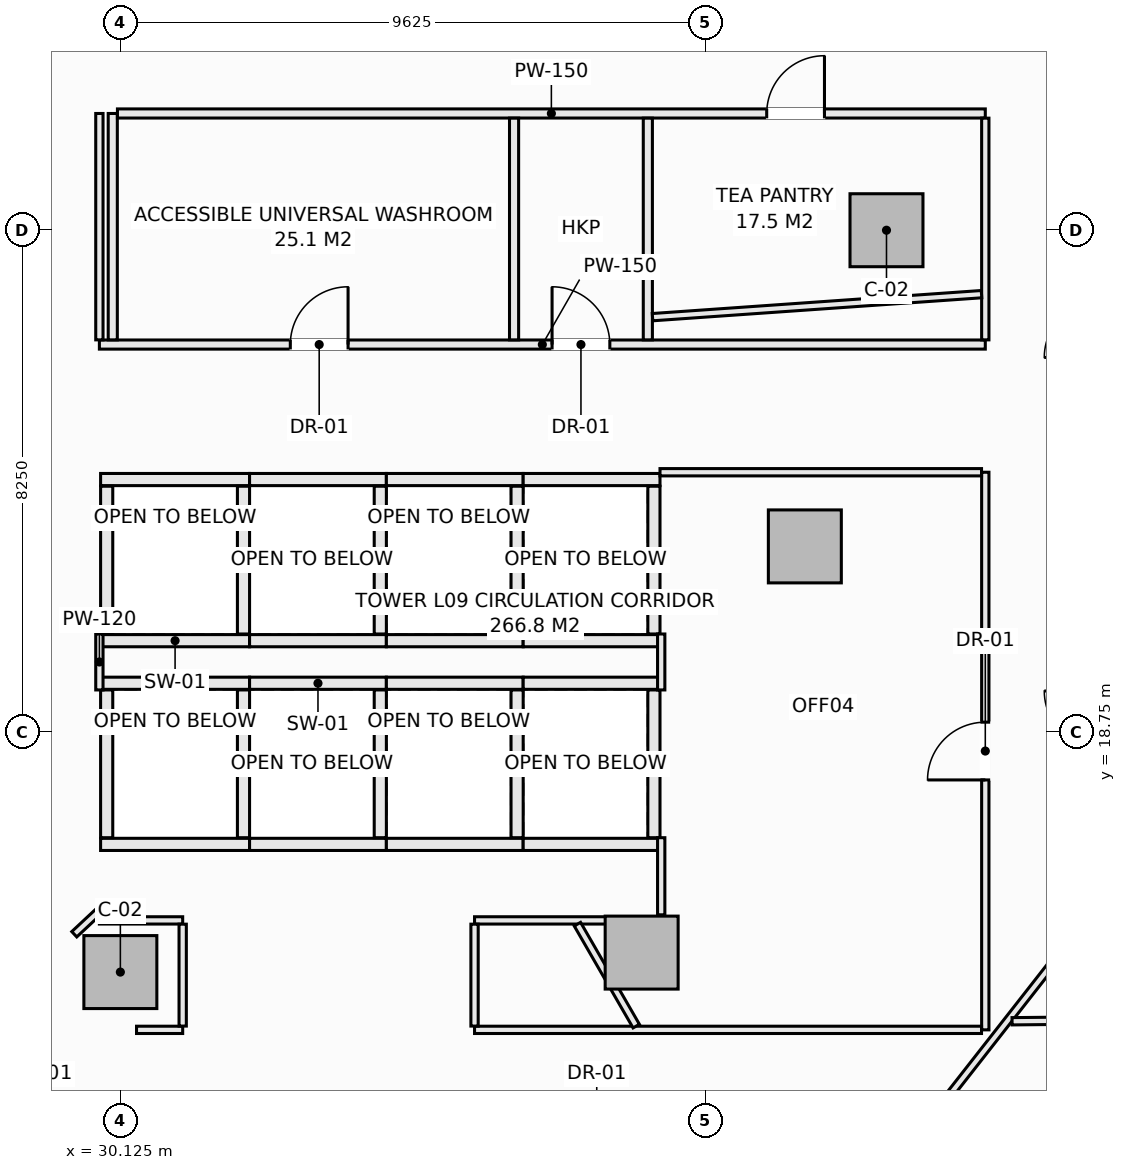
"""IFC4 building model, lengths in metres.
Left out: names, types, materials, properties, quantities, classifications, styles, units other than length and angle.
Written with IfcOpenShell. Run it as: python <this file> out.ifc"""

import sys

from ifc_helpers import new_model, si_unit, direction, frame, frame_2d, origin, origin_2d, place, context, subcontext, project, spatial, rectangle, extrude, element, fill, save


model = new_model("IFC4")
c1 = context("Model", 3, precision=1e-05, world=origin(), true_north=direction((0.0, 1.0)))
c2 = subcontext(c1, "Body", "Model", "MODEL_VIEW")
j1 = project(units=[si_unit("LENGTHUNIT", "METRE"), si_unit("PLANEANGLEUNIT", "RADIAN")], contexts=[c1])
p1 = place(None, origin())
s1 = spatial("IfcSite", under=j1, at=p1, CompositionType="ELEMENT")
p2 = place(p1, origin())
s2 = spatial("IfcBuilding", under=s1, at=p2, CompositionType="ELEMENT")
p3 = place(p2, frame((0.0, 0.0, 41.9)))
s3 = spatial("IfcBuildingStorey", under=s2, at=p3, CompositionType="ELEMENT", Elevation=41.9)
for number, where, z_axis, x_axis in (
    (1, (42.725, 27.0, -0.28), (0.0, 0.0, 1.0), (1.0, 0.0, 0.0)),
    (2, (30.125, 14.8, -0.28), (0.0, 0.0, 1.0), (1.0, 0.0, 0.0)),
    (3, (38.698, 15.121, -0.28), (0.0, 0.0, 1.0), (1.0, 0.0, 0.0)),
    (4, (41.382, 21.801, -0.28), (0.0, 0.0, 1.0), (1.0, 0.0, 0.0)),
):
    element("IfcColumn", number, at=place(p3, frame(where, z_axis=z_axis, x_axis=x_axis)), inside=s3, PredefinedType="COLUMN", context=c2, shape_type="SweptSolid", body=[
        extrude(rectangle(XDim=1.2, YDim=1.2, at=origin_2d()), origin(), (0.0, 0.0, 1.0), 3.85),
    ])
p4 = place(p3, frame((44.188, 7.514, 0.0), z_axis=(0.0, 0.0, 1.0), x_axis=(0.616421309777, 0.787416515482, 0.0)))
e5 = element("IfcWall", 5, at=p4, inside=s3, PredefinedType="SOLIDWALL", context=c2, shape_type="SweptSolid", body=[
    extrude(rectangle(XDim=6.696, YDim=0.3, at=frame_2d((3.348, 0.0))), origin(), (0.0, 0.0, 1.0), 3.093),
])
p5 = place(p4, frame((2.148, 0.0, 0.85)))
e6 = element("IfcOpeningElement", 6, at=p5, cuts=e5, PredefinedType="OPENING", context=c2, shape_type="SweptSolid", body=[
    extrude(rectangle(XDim=2.4, YDim=1.9, at=frame_2d((1.2, 0.95))), frame((0.0, 0.16, 0.0), z_axis=(0.0, -1.0, 0.0), x_axis=(1.0, 0.0, 0.0)), (0.0, 0.0, 1.0), 0.32),
])
for number, where, z_axis, x_axis in (
    (7, (29.8, 19.55, 0.0), (0.0, 0.0, 1.0), (1.0, 0.0, 0.0)),
    (8, (29.8, 16.9, 0.0), (0.0, 0.0, 1.0), (1.0, 0.0, 0.0)),
):
    element("IfcWall", number, at=place(p3, frame(where, z_axis=z_axis, x_axis=x_axis)), inside=s3, PredefinedType="SOLIDWALL", context=c2, shape_type="SweptSolid", body=[
        extrude(rectangle(XDim=2.45, YDim=0.2, at=frame_2d((1.225, 0.0))), origin(), (0.0, 0.0, 1.0), 3.57),
    ])
for number, where, z_axis, x_axis in (
    (9, (29.9, 17.01, 0.0), (0.0, 0.0, 1.0), (0.0, 1.0, 0.0)),
    (10, (32.15, 17.01, 0.0), (0.0, 0.0, 1.0), (0.0, 1.0, 0.0)),
):
    element("IfcWall", number, at=place(p3, frame(where, z_axis=z_axis, x_axis=x_axis)), inside=s3, PredefinedType="SOLIDWALL", context=c2, shape_type="SweptSolid", body=[
        extrude(rectangle(XDim=2.43, YDim=0.2, at=frame_2d((1.215, 0.0))), origin(), (0.0, 0.0, 1.0), 3.57),
    ])
for number, where, z_axis, x_axis in (
    (11, (32.25, 19.55, 0.0), (0.0, 0.0, 1.0), (1.0, 0.0, 0.0)),
    (12, (32.25, 16.9, 0.0), (0.0, 0.0, 1.0), (1.0, 0.0, 0.0)),
):
    element("IfcWall", number, at=place(p3, frame(where, z_axis=z_axis, x_axis=x_axis)), inside=s3, PredefinedType="SOLIDWALL", context=c2, shape_type="SweptSolid", body=[
        extrude(rectangle(XDim=2.25, YDim=0.2, at=frame_2d((1.125, 0.0))), origin(), (0.0, 0.0, 1.0), 3.57),
    ])
p6 = place(p3, frame((34.4, 17.01, 0.0), z_axis=(0.0, 0.0, 1.0), x_axis=(0.0, 1.0, 0.0)))
e13 = element("IfcWall", 13, at=p6, inside=s3, PredefinedType="SOLIDWALL", context=c2, shape_type="SweptSolid", body=[
    extrude(rectangle(XDim=2.43, YDim=0.2, at=frame_2d((1.215, 0.0))), origin(), (0.0, 0.0, 1.0), 3.57),
])
for number, where, z_axis, x_axis in (
    (14, (34.5, 19.55, 0.0), (0.0, 0.0, 1.0), (1.0, 0.0, 0.0)),
    (15, (34.5, 16.9, 0.0), (0.0, 0.0, 1.0), (1.0, 0.0, 0.0)),
):
    element("IfcWall", number, at=place(p3, frame(where, z_axis=z_axis, x_axis=x_axis)), inside=s3, PredefinedType="SOLIDWALL", context=c2, shape_type="SweptSolid", body=[
        extrude(rectangle(XDim=2.25, YDim=0.2, at=frame_2d((1.125, 0.0))), origin(), (0.0, 0.0, 1.0), 3.57),
    ])
p7 = place(p3, frame((36.65, 17.01, 0.0), z_axis=(0.0, 0.0, 1.0), x_axis=(0.0, 1.0, 0.0)))
e16 = element("IfcWall", 16, at=p7, inside=s3, PredefinedType="SOLIDWALL", context=c2, shape_type="SweptSolid", body=[
    extrude(rectangle(XDim=2.43, YDim=0.2, at=frame_2d((1.215, 0.0))), origin(), (0.0, 0.0, 1.0), 3.57),
])
for number, where, z_axis, x_axis in (
    (17, (36.75, 19.55, 0.0), (0.0, 0.0, 1.0), (1.0, 0.0, 0.0)),
    (18, (36.75, 16.9, 0.0), (0.0, 0.0, 1.0), (1.0, 0.0, 0.0)),
):
    element("IfcWall", number, at=place(p3, frame(where, z_axis=z_axis, x_axis=x_axis)), inside=s3, PredefinedType="SOLIDWALL", context=c2, shape_type="SweptSolid", body=[
        extrude(rectangle(XDim=2.25, YDim=0.2, at=frame_2d((1.125, 0.0))), origin(), (0.0, 0.0, 1.0), 3.57),
    ])
p8 = place(p3, frame((38.9, 17.01, 0.0), z_axis=(0.0, 0.0, 1.0), x_axis=(0.0, 1.0, 0.0)))
e19 = element("IfcWall", 19, at=p8, inside=s3, PredefinedType="SOLIDWALL", context=c2, shape_type="SweptSolid", body=[
    extrude(rectangle(XDim=2.43, YDim=0.2, at=frame_2d((1.215, 0.0))), origin(), (0.0, 0.0, 1.0), 3.57),
])
for number, where, z_axis, x_axis in (
    (20, (29.8, 22.9, 0.0), (0.0, 0.0, 1.0), (1.0, 0.0, 0.0)),
    (21, (29.8, 20.25, 0.0), (0.0, 0.0, 1.0), (1.0, 0.0, 0.0)),
):
    element("IfcWall", number, at=place(p3, frame(where, z_axis=z_axis, x_axis=x_axis)), inside=s3, PredefinedType="SOLIDWALL", context=c2, shape_type="SweptSolid", body=[
        extrude(rectangle(XDim=2.45, YDim=0.2, at=frame_2d((1.225, 0.0))), origin(), (0.0, 0.0, 1.0), 3.57),
    ])
for number, where, z_axis, x_axis in (
    (22, (29.9, 20.36, 0.0), (0.0, 0.0, 1.0), (0.0, 1.0, 0.0)),
    (23, (32.15, 20.36, 0.0), (0.0, 0.0, 1.0), (0.0, 1.0, 0.0)),
):
    element("IfcWall", number, at=place(p3, frame(where, z_axis=z_axis, x_axis=x_axis)), inside=s3, PredefinedType="SOLIDWALL", context=c2, shape_type="SweptSolid", body=[
        extrude(rectangle(XDim=2.43, YDim=0.2, at=frame_2d((1.215, 0.0))), origin(), (0.0, 0.0, 1.0), 3.57),
    ])
for number, where, z_axis, x_axis in (
    (24, (32.25, 22.9, 0.0), (0.0, 0.0, 1.0), (1.0, 0.0, 0.0)),
    (25, (32.25, 20.25, 0.0), (0.0, 0.0, 1.0), (1.0, 0.0, 0.0)),
):
    element("IfcWall", number, at=place(p3, frame(where, z_axis=z_axis, x_axis=x_axis)), inside=s3, PredefinedType="SOLIDWALL", context=c2, shape_type="SweptSolid", body=[
        extrude(rectangle(XDim=2.25, YDim=0.2, at=frame_2d((1.125, 0.0))), origin(), (0.0, 0.0, 1.0), 3.57),
    ])
p9 = place(p3, frame((34.4, 20.36, 0.0), z_axis=(0.0, 0.0, 1.0), x_axis=(0.0, 1.0, 0.0)))
e26 = element("IfcWall", 26, at=p9, inside=s3, PredefinedType="SOLIDWALL", context=c2, shape_type="SweptSolid", body=[
    extrude(rectangle(XDim=2.43, YDim=0.2, at=frame_2d((1.215, 0.0))), origin(), (0.0, 0.0, 1.0), 3.57),
])
for number, where, z_axis, x_axis in (
    (27, (34.5, 22.9, 0.0), (0.0, 0.0, 1.0), (1.0, 0.0, 0.0)),
    (28, (34.5, 20.25, 0.0), (0.0, 0.0, 1.0), (1.0, 0.0, 0.0)),
):
    element("IfcWall", number, at=place(p3, frame(where, z_axis=z_axis, x_axis=x_axis)), inside=s3, PredefinedType="SOLIDWALL", context=c2, shape_type="SweptSolid", body=[
        extrude(rectangle(XDim=2.25, YDim=0.2, at=frame_2d((1.125, 0.0))), origin(), (0.0, 0.0, 1.0), 3.57),
    ])
p10 = place(p3, frame((36.65, 20.36, 0.0), z_axis=(0.0, 0.0, 1.0), x_axis=(0.0, 1.0, 0.0)))
e29 = element("IfcWall", 29, at=p10, inside=s3, PredefinedType="SOLIDWALL", context=c2, shape_type="SweptSolid", body=[
    extrude(rectangle(XDim=2.43, YDim=0.2, at=frame_2d((1.215, 0.0))), origin(), (0.0, 0.0, 1.0), 3.57),
])
for number, where, z_axis, x_axis in (
    (30, (36.75, 22.9, 0.0), (0.0, 0.0, 1.0), (1.0, 0.0, 0.0)),
    (31, (36.75, 20.25, 0.0), (0.0, 0.0, 1.0), (1.0, 0.0, 0.0)),
):
    element("IfcWall", number, at=place(p3, frame(where, z_axis=z_axis, x_axis=x_axis)), inside=s3, PredefinedType="SOLIDWALL", context=c2, shape_type="SweptSolid", body=[
        extrude(rectangle(XDim=2.25, YDim=0.2, at=frame_2d((1.125, 0.0))), origin(), (0.0, 0.0, 1.0), 3.57),
    ])
p11 = place(p3, frame((38.9, 20.36, 0.0), z_axis=(0.0, 0.0, 1.0), x_axis=(0.0, 1.0, 0.0)))
e32 = element("IfcWall", 32, at=p11, inside=s3, PredefinedType="SOLIDWALL", context=c2, shape_type="SweptSolid", body=[
    extrude(rectangle(XDim=2.43, YDim=0.2, at=frame_2d((1.215, 0.0))), origin(), (0.0, 0.0, 1.0), 3.57),
])
p12 = place(p3, frame((29.78, 25.12, 0.0), z_axis=(0.0, 0.0, 1.0), x_axis=(1.0, 0.0, 0.0)))
e33 = element("IfcWall", 33, at=p12, inside=s3, PredefinedType="PARTITIONING", context=c2, shape_type="SweptSolid", body=[
    extrude(rectangle(XDim=14.57, YDim=0.15, at=frame_2d((7.285, 0.0))), origin(), (0.0, 0.0, 1.0), 3.57),
])
p13 = place(p12, frame((3.14, 0.0, 0.0)))
e34 = element("IfcOpeningElement", 34, at=p13, cuts=e33, PredefinedType="OPENING", context=c2, shape_type="SweptSolid", body=[
    extrude(rectangle(XDim=0.95, YDim=2.1, at=frame_2d((0.475, 1.05))), frame((0.0, 0.085, 0.0), z_axis=(0.0, -1.0, 0.0), x_axis=(1.0, 0.0, 0.0)), (0.0, 0.0, 1.0), 0.17),
])
p14 = place(p12, frame((7.445, 0.0, 0.0)))
e35 = element("IfcOpeningElement", 35, at=p14, cuts=e33, PredefinedType="OPENING", context=c2, shape_type="SweptSolid", body=[
    extrude(rectangle(XDim=0.95, YDim=2.1, at=frame_2d((0.475, 1.05))), frame((0.0, 0.085, 0.0), z_axis=(0.0, -1.0, 0.0), x_axis=(1.0, 0.0, 0.0)), (0.0, 0.0, 1.0), 0.17),
])
p15 = place(p3, frame((30.0, 25.197, 0.0), z_axis=(0.0, 0.0, 1.0), x_axis=(0.0, 1.0, 0.0)))
e36 = element("IfcWall", 36, at=p15, inside=s3, PredefinedType="PARTITIONING", context=c2, shape_type="SweptSolid", body=[
    extrude(rectangle(XDim=3.723, YDim=0.15, at=frame_2d((1.861, 0.0))), origin(), (0.0, 0.0, 1.0), 3.57),
])
p16 = place(p3, frame((30.077, 28.92, 0.0), z_axis=(0.0, 0.0, 1.0), x_axis=(1.0, 0.0, 0.0)))
e37 = element("IfcWall", 37, at=p16, inside=s3, PredefinedType="PARTITIONING", context=c2, shape_type="SweptSolid", body=[
    extrude(rectangle(XDim=14.273, YDim=0.15, at=frame_2d((7.137, 0.0))), origin(), (0.0, 0.0, 1.0), 3.57),
])
p17 = place(p16, frame((10.678, 0.0, 0.0)))
e38 = element("IfcOpeningElement", 38, at=p17, cuts=e37, PredefinedType="OPENING", context=c2, shape_type="SweptSolid", body=[
    extrude(rectangle(XDim=0.95, YDim=2.1, at=frame_2d((0.475, 1.05))), frame((0.0, 0.085, 0.0), z_axis=(0.0, -1.0, 0.0), x_axis=(1.0, 0.0, 0.0)), (0.0, 0.0, 1.0), 0.17),
])
for number, where, z_axis, x_axis in (
    (39, (36.6, 25.197, 0.0), (0.0, 0.0, 1.0), (0.0, 1.0, 0.0)),
    (40, (38.8, 25.197, 0.0), (0.0, 0.0, 1.0), (0.0, 1.0, 0.0)),
):
    element("IfcWall", number, at=place(p3, frame(where, z_axis=z_axis, x_axis=x_axis)), inside=s3, PredefinedType="PARTITIONING", context=c2, shape_type="SweptSolid", body=[
        extrude(rectangle(XDim=3.646, YDim=0.15, at=frame_2d((1.823, 0.0))), origin(), (0.0, 0.0, 1.0), 3.57),
    ])
p18 = place(p3, frame((29.78, 19.44, 0.0), z_axis=(0.0, 0.0, 1.0), x_axis=(0.0, 1.0, 0.0)))
e41 = element("IfcWall", 41, at=p18, inside=s3, PredefinedType="PARTITIONING", context=c2, shape_type="SweptSolid", body=[
    extrude(rectangle(XDim=0.92, YDim=0.12, at=frame_2d((0.46, 0.0))), origin(), (0.0, 0.0, 1.0), 3.57),
])
p19 = place(p3, frame((29.78, 25.197, 0.0), z_axis=(0.0, 0.0, 1.0), x_axis=(0.0, 1.0, 0.0)))
e42 = element("IfcWall", 42, at=p19, inside=s3, PredefinedType="PARTITIONING", context=c2, shape_type="SweptSolid", body=[
    extrude(rectangle(XDim=3.723, YDim=0.12, at=frame_2d((1.861, 0.0))), origin(), (0.0, 0.0, 1.0), 3.57),
])
p20 = place(p3, frame((44.35, 13.85, 0.0), z_axis=(0.0, 0.0, 1.0), x_axis=(0.0, 1.0, 0.0)))
e43 = element("IfcWall", 43, at=p20, inside=s3, PredefinedType="PARTITIONING", context=c2, shape_type="SweptSolid", body=[
    extrude(rectangle(XDim=9.17, YDim=0.12, at=frame_2d((4.585, 0.0))), origin(), (0.0, 0.0, 1.0), 3.57),
])
p21 = place(p20, frame((4.11, 0.0, 0.0)))
e44 = element("IfcOpeningElement", 44, at=p21, cuts=e43, PredefinedType="OPENING", context=c2, shape_type="SweptSolid", body=[
    extrude(rectangle(XDim=0.95, YDim=2.1, at=frame_2d((0.475, 1.05))), frame((0.0, 0.07, 0.0), z_axis=(0.0, -1.0, 0.0), x_axis=(1.0, 0.0, 0.0)), (0.0, 0.0, 1.0), 0.14),
])
p22 = place(p3, frame((44.35, 25.197, 0.0), z_axis=(0.0, 0.0, 1.0), x_axis=(0.0, 1.0, 0.0)))
e45 = element("IfcWall", 45, at=p22, inside=s3, PredefinedType="PARTITIONING", context=c2, shape_type="SweptSolid", body=[
    extrude(rectangle(XDim=3.646, YDim=0.12, at=frame_2d((1.823, 0.0))), origin(), (0.0, 0.0, 1.0), 3.57),
])
p23 = place(p3, frame((42.957, 11.75, 0.0), z_axis=(0.0, 0.0, 1.0), x_axis=(0.616428289415, 0.78741105149, 0.0)))
e46 = element("IfcWall", 46, at=p23, inside=s3, PredefinedType="PARTITIONING", context=c2, shape_type="SweptSolid", body=[
    extrude(rectangle(XDim=5.375, YDim=0.12, at=frame_2d((2.687, 0.0))), origin(), (0.0, 0.0, 1.0), 3.57),
])
p24 = place(p3, frame((30.391, 13.85, 0.0), z_axis=(0.0, 0.0, 1.0), x_axis=(1.0, 0.0, 0.0)))
e47 = element("IfcWall", 47, at=p24, inside=s3, PredefinedType="PARTITIONING", context=c2, shape_type="SweptSolid", body=[
    extrude(rectangle(XDim=0.759, YDim=0.12, at=frame_2d((0.379, 0.0))), origin(), (0.0, 0.0, 1.0), 3.57),
])
p25 = place(p3, frame((35.95, 13.85, 0.0), z_axis=(0.0, 0.0, 1.0), x_axis=(1.0, 0.0, 0.0)))
e48 = element("IfcWall", 48, at=p25, inside=s3, PredefinedType="PARTITIONING", context=c2, shape_type="SweptSolid", body=[
    extrude(rectangle(XDim=8.338, YDim=0.12, at=frame_2d((4.169, 0.0))), origin(), (0.0, 0.0, 1.0), 3.57),
])
p26 = place(p3, frame((29.78, 15.65, 0.0), z_axis=(0.0, 0.0, 1.0), x_axis=(1.0, 0.0, 0.0)))
e49 = element("IfcWall", 49, at=p26, inside=s3, PredefinedType="PARTITIONING", context=c2, shape_type="SweptSolid", body=[
    extrude(rectangle(XDim=1.37, YDim=0.12, at=frame_2d((0.685, 0.0))), origin(), (0.0, 0.0, 1.0), 3.57),
])
p27 = place(p3, frame((35.95, 15.65, 0.0), z_axis=(0.0, 0.0, 1.0), x_axis=(1.0, 0.0, 0.0)))
e50 = element("IfcWall", 50, at=p27, inside=s3, PredefinedType="PARTITIONING", context=c2, shape_type="SweptSolid", body=[
    extrude(rectangle(XDim=2.291, YDim=0.12, at=frame_2d((1.146, 0.0))), origin(), (0.0, 0.0, 1.0), 3.57),
])
p28 = place(p3, frame((35.95, 13.912, 0.0), z_axis=(0.0, 0.0, 1.0), x_axis=(0.0, 1.0, 0.0)))
e51 = element("IfcWall", 51, at=p28, inside=s3, PredefinedType="PARTITIONING", context=c2, shape_type="SweptSolid", body=[
    extrude(rectangle(XDim=1.676, YDim=0.12, at=frame_2d((0.838, 0.0))), origin(), (0.0, 0.0, 1.0), 3.57),
])
p29 = place(p3, frame((39.0, 23.02, 0.0), z_axis=(0.0, 0.0, 1.0), x_axis=(1.0, 0.0, 0.0)))
e52 = element("IfcWall", 52, at=p29, inside=s3, PredefinedType="PARTITIONING", context=c2, shape_type="SweptSolid", body=[
    extrude(rectangle(XDim=5.288, YDim=0.12, at=frame_2d((2.644, 0.0))), origin(), (0.0, 0.0, 1.0), 3.57),
])
p30 = place(p3, frame((39.02, 15.742, 0.0), z_axis=(0.0, 0.0, 1.0), x_axis=(0.0, 1.0, 0.0)))
e53 = element("IfcWall", 53, at=p30, inside=s3, PredefinedType="PARTITIONING", context=c2, shape_type="SweptSolid", body=[
    extrude(rectangle(XDim=1.268, YDim=0.12, at=frame_2d((0.634, 0.0))), origin(), (0.0, 0.0, 1.0), 2.934),
])
p31 = place(p3, frame((39.02, 19.44, 0.0), z_axis=(0.0, 0.0, 1.0), x_axis=(0.0, 1.0, 0.0)))
e54 = element("IfcWall", 54, at=p31, inside=s3, PredefinedType="PARTITIONING", context=c2, shape_type="SweptSolid", body=[
    extrude(rectangle(XDim=0.92, YDim=0.12, at=frame_2d((0.46, 0.0))), origin(), (0.0, 0.0, 1.0), 3.57),
])
p32 = place(p3, frame((29.367, 15.422, 0.0), z_axis=(0.0, 0.0, 1.0), x_axis=(0.730667420492, 0.682733564893, 0.0)))
e55 = element("IfcWall", 55, at=p32, inside=s3, PredefinedType="PARTITIONING", context=c2, shape_type="SweptSolid", body=[
    extrude(rectangle(XDim=0.565, YDim=0.12, at=frame_2d((0.283, 0.0))), origin(), (0.0, 0.0, 1.0), 3.57),
])
p33 = place(p3, frame((31.15, 13.912, 0.0), z_axis=(0.0, 0.0, 1.0), x_axis=(0.0, 1.0, 0.0)))
e56 = element("IfcWall", 56, at=p33, inside=s3, PredefinedType="PARTITIONING", context=c2, shape_type="SweptSolid", body=[
    extrude(rectangle(XDim=1.676, YDim=0.12, at=frame_2d((0.838, 0.0))), origin(), (0.0, 0.0, 1.0), 3.57),
])
p34 = place(p3, frame((44.79, 13.991, 0.0), z_axis=(0.0, 0.0, 1.0), x_axis=(0.999951876208, 0.009810467268, 0.0)))
e57 = element("IfcWall", 57, at=p34, inside=s3, PredefinedType="PARTITIONING", context=c2, shape_type="SweptSolid", body=[
    extrude(rectangle(XDim=5.798, YDim=0.12, at=frame_2d((2.899, 0.0))), origin(), (0.0, 0.0, 1.0), 3.205),
])
p35 = place(p3, frame((37.642, 15.588, 0.0), z_axis=(0.0, 0.0, 1.0), x_axis=(0.499911776505, -0.866076333652, 0.0)))
e58 = element("IfcWall", 58, at=p35, inside=s3, PredefinedType="PARTITIONING", context=c2, shape_type="SweptSolid", body=[
    extrude(rectangle(XDim=1.935, YDim=0.12, at=frame_2d((0.967, 0.0))), origin(), (0.0, 0.0, 1.0), 3.57),
])
p36 = place(p3, frame((38.877, 25.57, 0.0), z_axis=(0.0, 0.0, 1.0), x_axis=(0.997563605061, 0.069762840094, 0.0)))
e59 = element("IfcWall", 59, at=p36, inside=s3, PredefinedType="PARTITIONING", context=c2, shape_type="SweptSolid", body=[
    extrude(rectangle(XDim=5.424, YDim=0.12, at=frame_2d((2.712, 0.0))), origin(), (0.0, 0.0, 1.0), 3.57),
])
p37 = place(p13, origin())
e60 = element("IfcDoor", 60, at=p37, inside=s3, OperationType="SINGLE_SWING_RIGHT", PredefinedType="DOOR", context=c2, shape_type="SweptSolid", body=[
    extrude(rectangle(XDim=0.95, YDim=2.1, at=frame_2d((0.475, 1.05))), frame((0.0, 0.025, 0.0), z_axis=(0.0, -1.0, 0.0), x_axis=(1.0, 0.0, 0.0)), (0.0, 0.0, 1.0), 0.05),
])
fill(e34, e60)
p38 = place(p14, origin())
e61 = element("IfcDoor", 61, at=p38, inside=s3, OperationType="SINGLE_SWING_LEFT", PredefinedType="DOOR", context=c2, shape_type="SweptSolid", body=[
    extrude(rectangle(XDim=0.95, YDim=2.1, at=frame_2d((0.475, 1.05))), frame((0.0, 0.025, 0.0), z_axis=(0.0, -1.0, 0.0), x_axis=(1.0, 0.0, 0.0)), (0.0, 0.0, 1.0), 0.05),
])
fill(e35, e61)
p39 = place(p21, origin())
e62 = element("IfcDoor", 62, at=p39, inside=s3, OperationType="SINGLE_SWING_LEFT", PredefinedType="DOOR", context=c2, shape_type="SweptSolid", body=[
    extrude(rectangle(XDim=0.95, YDim=2.1, at=frame_2d((0.475, 1.05))), frame((0.0, 0.025, 0.0), z_axis=(0.0, -1.0, 0.0), x_axis=(1.0, 0.0, 0.0)), (0.0, 0.0, 1.0), 0.05),
])
fill(e44, e62)
p40 = place(p17, origin())
e63 = element("IfcDoor", 63, at=p40, inside=s3, OperationType="SINGLE_SWING_RIGHT", PredefinedType="DOOR", context=c2, shape_type="SweptSolid", body=[
    extrude(rectangle(XDim=0.95, YDim=2.1, at=frame_2d((0.475, 1.05))), frame((0.0, 0.025, 0.0), z_axis=(0.0, -1.0, 0.0), x_axis=(1.0, 0.0, 0.0)), (0.0, 0.0, 1.0), 0.05),
])
fill(e38, e63)
save(model, sys.argv[1])
